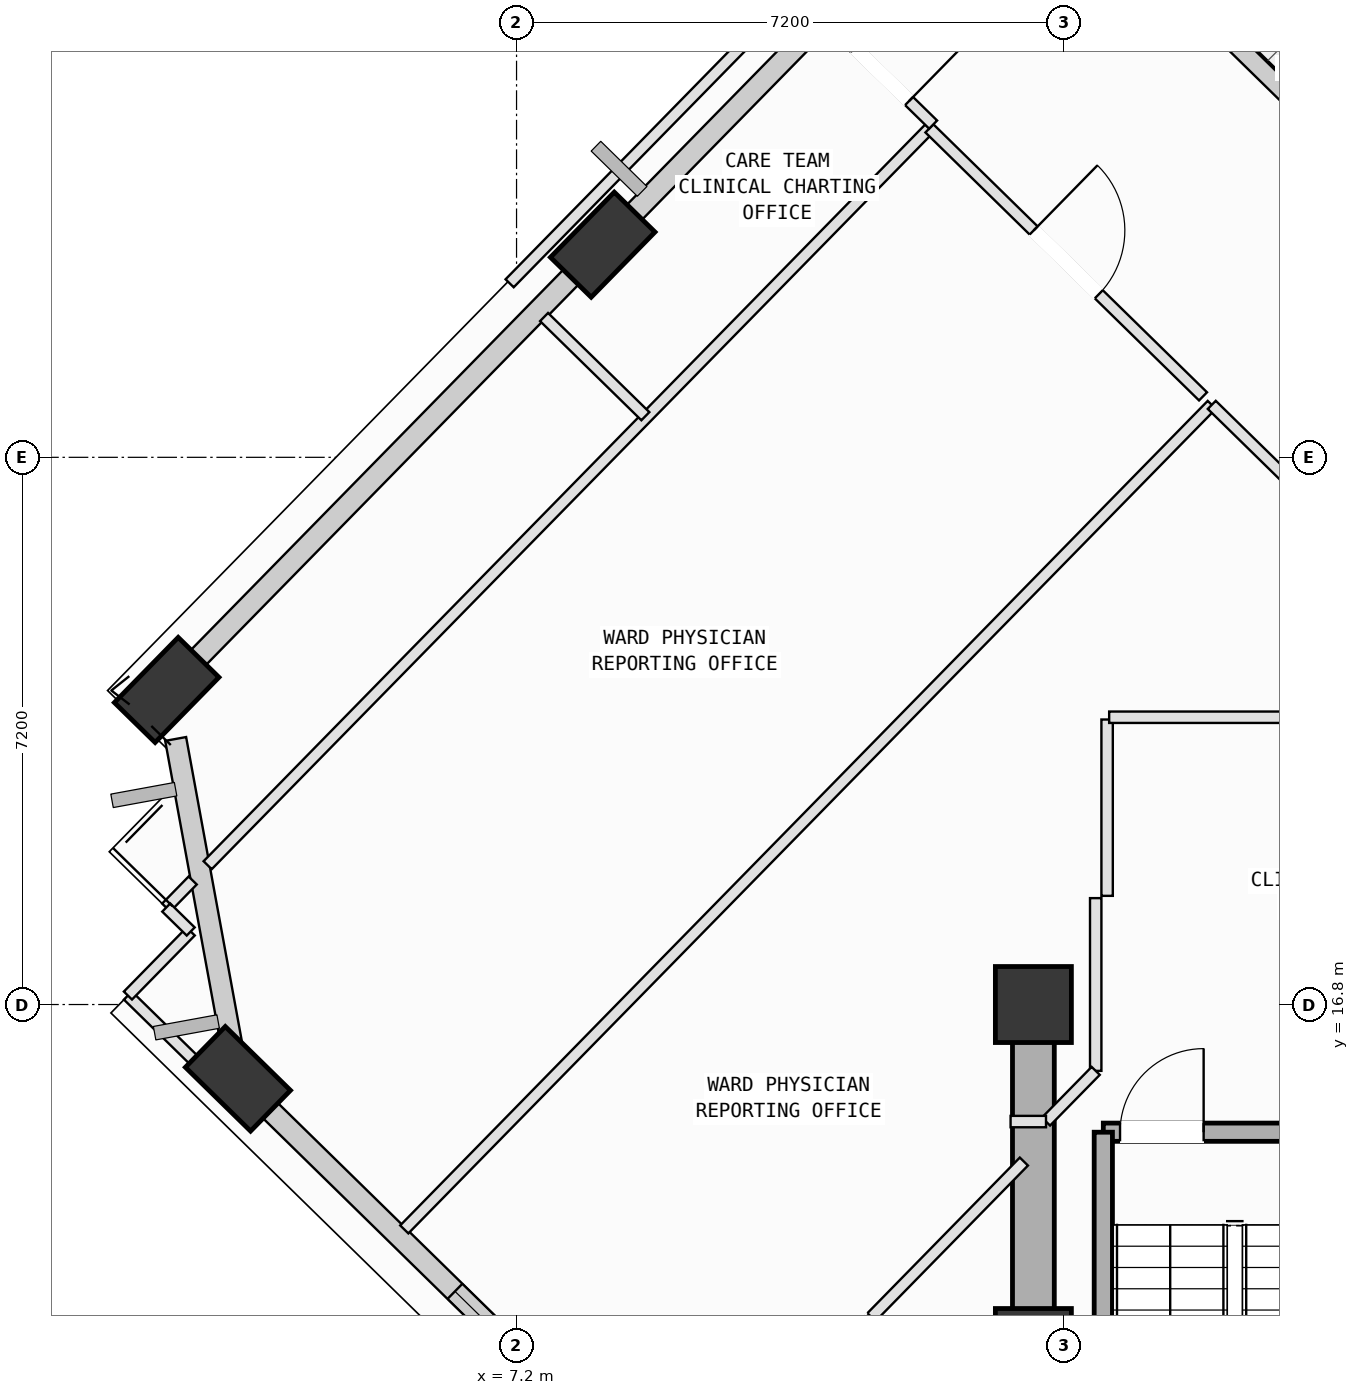
"""IFC4 building model, lengths in metres.
Left out: names, types, materials, properties, quantities, classifications, styles, units other than length and angle.
Written with IfcOpenShell. Run it as: python <this file> out.ifc"""

import sys

from ifc_helpers import new_model, si_unit, direction, frame, frame_2d, origin, origin_2d, place, context, subcontext, project, spatial, rectangle, extrude, element, fill, save


model = new_model("IFC4")
c1 = context("Model", 3, precision=1e-05, world=origin(), true_north=direction((0.0, 1.0)))
c2 = subcontext(c1, "Body", "Model", "MODEL_VIEW")
j1 = project(units=[si_unit("LENGTHUNIT", "METRE"), si_unit("PLANEANGLEUNIT", "RADIAN")], contexts=[c1])
p1 = place(None, origin())
s1 = spatial("IfcSite", under=j1, at=p1, CompositionType="ELEMENT")
p2 = place(p1, origin())
s2 = spatial("IfcBuilding", under=s1, at=p2, CompositionType="ELEMENT")
p3 = place(p2, frame((0.0, 0.0, 219.2)))
s3 = spatial("IfcBuildingStorey", under=s2, at=p3, CompositionType="ELEMENT", Elevation=219.2)
for number, where, z_axis, x_axis in (
    (1, (14.0, 12.3, 0.0), (0.0, 0.0, 1.0), (1.0, 0.0, 0.0)),
    (2, (14.0, 16.8, 0.0), (0.0, 0.0, 1.0), (1.0, 0.0, 0.0)),
):
    element("IfcColumn", number, at=place(p3, frame(where, z_axis=z_axis, x_axis=x_axis)), inside=s3, PredefinedType="COLUMN", context=c2, shape_type="SweptSolid", body=[
        extrude(rectangle(XDim=1.0, YDim=1.0, at=origin_2d()), origin(), (0.0, 0.0, 1.0), 4.0),
    ])
p4 = place(p3, frame((8.334, 26.798, 0.002), z_axis=(-0.007351582684, -0.104198052093, 0.994529396334), x_axis=(0.747937181643, 0.659560518907, 0.074631723923)))
e3 = element("IfcColumn", 3, at=p4, inside=s3, PredefinedType="COLUMN", context=c2, shape_type="SweptSolid", body=[
    extrude(rectangle(XDim=1.2, YDim=0.75, at=origin_2d()), origin(), (0.0, 0.0, 1.0), 4.018),
])
p5 = place(p3, frame((2.597, 20.939, 0.002), z_axis=(0.01696374855, -0.12734928376, 0.991712857213), x_axis=(0.599980057528, 0.794731585162, 0.091791274721)))
e4 = element("IfcColumn", 4, at=p5, inside=s3, PredefinedType="COLUMN", context=c2, shape_type="SweptSolid", body=[
    extrude(rectangle(XDim=1.2, YDim=0.75, at=origin_2d()), origin(), (0.0, 0.0, 1.0), 4.03),
])
p6 = place(p3, frame((3.534, 15.822, 0.002), z_axis=(0.037923851967, -0.123222228275, 0.991654205815), x_axis=(-0.886953136562, 0.452964918378, 0.090204857198)))
e5 = element("IfcColumn", 5, at=p6, inside=s3, PredefinedType="COLUMN", context=c2, shape_type="SweptSolid", body=[
    extrude(rectangle(XDim=1.2, YDim=0.75, at=origin_2d()), origin(), (0.0, 0.0, 1.0), 4.03),
])
p7 = place(p3, frame((15.708, 30.369, 0.0), z_axis=(0.0, 0.0, 1.0), x_axis=(0.71445197499, -0.699684482773, 0.0)))
e6 = element("IfcWall", 6, at=p7, inside=s3, PredefinedType="SOLIDWALL", context=c2, shape_type="SweptSolid", body=[
    extrude(rectangle(XDim=6.96, YDim=0.24, at=frame_2d((3.48, 0.0))), origin(), (0.0, 0.0, 1.0), 3.265),
])
p8 = place(p7, frame((3.597, 0.0, 0.0)))
e7 = element("IfcOpeningElement", 7, at=p8, cuts=e6, PredefinedType="OPENING", context=c2, shape_type="SweptSolid", body=[
    extrude(rectangle(XDim=1.1, YDim=2.15, at=frame_2d((0.55, 1.075))), frame((0.0, 0.13, 0.0), z_axis=(0.0, -1.0, 0.0), x_axis=(1.0, 0.0, 0.0)), (0.0, 0.0, 1.0), 0.26),
])
p9 = place(p3, frame((8.483, 26.951, 0.0), z_axis=(0.0, 0.0, 1.0), x_axis=(0.699662514677, 0.714473488351, 0.0)))
e8 = element("IfcWall", 8, at=p9, inside=s3, PredefinedType="SOLIDWALL", context=c2, shape_type="SweptSolid", body=[
    extrude(rectangle(XDim=7.434, YDim=0.28, at=frame_2d((3.717, 0.0))), origin(), (0.0, 0.0, 1.0), 3.265),
])
p10 = place(p3, frame((2.724, 21.069, 0.0), z_axis=(0.0, 0.0, 1.0), x_axis=(0.699663647381, 0.714472379125, 0.0)))
e9 = element("IfcWall", 9, at=p10, inside=s3, PredefinedType="SOLIDWALL", context=c2, shape_type="SweptSolid", body=[
    extrude(rectangle(XDim=7.485, YDim=0.28, at=frame_2d((3.742, 0.0))), origin(), (0.0, 0.0, 1.0), 3.265),
])
p11 = place(p3, frame((3.51, 15.958, 0.0), z_axis=(0.0, 0.0, 1.0), x_axis=(-0.180230519559, 0.983624399768, 0.0)))
e10 = element("IfcWall", 10, at=p11, inside=s3, PredefinedType="SOLIDWALL", context=c2, shape_type="SweptSolid", body=[
    extrude(rectangle(XDim=4.408, YDim=0.28, at=frame_2d((2.204, 0.0))), origin(), (0.0, 0.0, 1.0), 3.265),
])
p12 = place(p3, frame((8.133, 11.319, 0.0), z_axis=(0.0, 0.0, 1.0), x_axis=(-0.714479464063, 0.699656412414, 0.0)))
e11 = element("IfcWall", 11, at=p12, inside=s3, PredefinedType="SOLIDWALL", context=c2, shape_type="SweptSolid", body=[
    extrude(rectangle(XDim=5.831, YDim=0.28, at=frame_2d((2.915, 0.0))), origin(), (0.0, 0.0, 1.0), 3.265),
])
p13 = place(p12, frame((0.84, 0.0, 0.75)))
e12 = element("IfcOpeningElement", 12, at=p13, cuts=e11, PredefinedType="OPENING", context=c2, shape_type="SweptSolid", body=[
    extrude(rectangle(XDim=1.6, YDim=1.95, at=frame_2d((0.8, 0.975))), frame((0.0, 0.15, 0.0), z_axis=(0.0, -1.0, 0.0), x_axis=(1.0, 0.0, 0.0)), (0.0, 0.0, 1.0), 0.3),
])
p14 = place(p3, frame((14.92, 15.12, 0.0), z_axis=(0.0, 0.0, 1.0), x_axis=(1.0, 0.0, 0.0)))
e13 = element("IfcWall", 13, at=p14, inside=s3, PredefinedType="SOLIDWALL", context=c2, shape_type="SweptSolid", body=[
    extrude(rectangle(XDim=3.46, YDim=0.24, at=frame_2d((1.73, 0.0))), origin(), (0.0, 0.0, 1.0), 3.78),
])
p15 = place(p14, frame((0.22, 0.0, 0.0)))
e14 = element("IfcOpeningElement", 14, at=p15, cuts=e13, PredefinedType="OPENING", context=c2, shape_type="SweptSolid", body=[
    extrude(rectangle(XDim=1.1, YDim=2.15, at=frame_2d((0.55, 1.075))), frame((0.0, 0.13, 0.0), z_axis=(0.0, -1.0, 0.0), x_axis=(1.0, 0.0, 0.0)), (0.0, 0.0, 1.0), 0.26),
])
p16 = place(p3, frame((14.92, 8.075, 0.0), z_axis=(0.0, 0.0, 1.0), x_axis=(0.0, 1.0, 0.0)))
e15 = element("IfcWall", 15, at=p16, inside=s3, PredefinedType="SOLIDWALL", context=c2, shape_type="SweptSolid", body=[
    extrude(rectangle(XDim=7.045, YDim=0.24, at=frame_2d((3.522, 0.0))), origin(), (0.0, 0.0, 1.0), 3.78),
])
p17 = place(p3, frame((14.0, 16.8, 0.0), z_axis=(0.0, 0.0, 1.0), x_axis=(0.0, -1.0, 0.0)))
e16 = element("IfcWall", 16, at=p17, inside=s3, PredefinedType="SHEAR", context=c2, shape_type="SweptSolid", body=[
    extrude(rectangle(XDim=9.0, YDim=0.55, at=frame_2d((4.5, 0.0))), origin(), (0.0, 0.0, 1.0), 3.78),
])
p18 = place(p3, frame((9.438, 10.203, 0.0), z_axis=(0.0, 0.0, 1.0), x_axis=(0.699657139169, 0.714478752385, 0.0)))
e17 = element("IfcWall", 17, at=p18, inside=s3, PredefinedType="PARTITIONING", context=c2, shape_type="SweptSolid", body=[
    extrude(rectangle(XDim=6.342, YDim=0.15, at=frame_2d((3.171, 0.0))), origin(), (0.0, 0.0, 1.0), 3.78),
])
p19 = place(p18, frame((2.616, 0.0, 0.0)))
e18 = element("IfcOpeningElement", 18, at=p19, cuts=e17, PredefinedType="OPENING", context=c2, shape_type="SweptSolid", body=[
    extrude(rectangle(XDim=0.86, YDim=2.06, at=frame_2d((0.43, 1.03))), frame((0.0, 0.085, 0.0), z_axis=(0.0, -1.0, 0.0), x_axis=(1.0, 0.0, 0.0)), (0.0, 0.0, 1.0), 0.17),
])
p20 = place(p3, frame((14.97, 20.55, 0.0), z_axis=(0.0, 0.0, 1.0), x_axis=(0.0, -1.0, 0.0)))
e19 = element("IfcWall", 19, at=p20, inside=s3, PredefinedType="PARTITIONING", context=c2, shape_type="SweptSolid", body=[
    extrude(rectangle(XDim=2.32, YDim=0.15, at=frame_2d((1.16, 0.0))), origin(), (0.0, 0.0, 1.0), 3.78),
])
p21 = place(p3, frame((14.82, 18.2, 0.0), z_axis=(0.0, 0.0, 1.0), x_axis=(0.0, -1.0, 0.0)))
e20 = element("IfcWall", 20, at=p21, inside=s3, PredefinedType="PARTITIONING", context=c2, shape_type="SweptSolid", body=[
    extrude(rectangle(XDim=2.273, YDim=0.15, at=frame_2d((1.136, 0.0))), origin(), (0.0, 0.0, 1.0), 3.78),
])
p22 = place(p3, frame((14.82, 15.927, 0.0), z_axis=(0.0, 0.0, 1.0), x_axis=(-0.700147182602, -0.713998545303, 0.0)))
e21 = element("IfcWall", 21, at=p22, inside=s3, PredefinedType="PARTITIONING", context=c2, shape_type="SweptSolid", body=[
    extrude(rectangle(XDim=0.934, YDim=0.15, at=frame_2d((0.467, 0.0))), origin(), (0.0, 0.0, 1.0), 3.78),
])
p23 = place(p3, frame((14.166, 15.26, 0.0), z_axis=(0.0, 0.0, 1.0), x_axis=(-1.0, 0.0, 0.0)))
e22 = element("IfcWall", 22, at=p23, inside=s3, PredefinedType="PARTITIONING", context=c2, shape_type="SweptSolid", body=[
    extrude(rectangle(XDim=0.466, YDim=0.15, at=frame_2d((0.233, 0.0))), origin(), (0.0, 0.0, 1.0), 3.78),
])
p24 = place(p3, frame((5.723, 13.841, 0.0), z_axis=(0.0, 0.0, 1.0), x_axis=(0.69966395239, 0.714472080438, 0.0)))
e23 = element("IfcWall", 23, at=p24, inside=s3, PredefinedType="PARTITIONING", context=c2, shape_type="SweptSolid", body=[
    extrude(rectangle(XDim=15.185, YDim=0.15, at=frame_2d((7.592, 0.0))), origin(), (0.0, 0.0, 1.0), 3.78),
])
p25 = place(p3, frame((16.347, 24.69, 0.0), z_axis=(0.0, 0.0, 1.0), x_axis=(0.714527579213, -0.699607274508, 0.0)))
e24 = element("IfcWall", 24, at=p25, inside=s3, PredefinedType="PARTITIONING", context=c2, shape_type="SweptSolid", body=[
    extrude(rectangle(XDim=5.04, YDim=0.15, at=frame_2d((2.52, 0.0))), origin(), (0.0, 0.0, 1.0), 3.78),
])
p26 = place(p25, frame((1.92, 0.0, 0.0)))
e25 = element("IfcOpeningElement", 25, at=p26, cuts=e24, PredefinedType="OPENING", context=c2, shape_type="SweptSolid", body=[
    extrude(rectangle(XDim=1.2, YDim=2.15, at=frame_2d((0.6, 1.075))), frame((0.0, 0.085, 0.0), z_axis=(0.0, -1.0, 0.0), x_axis=(1.0, 0.0, 0.0)), (0.0, 0.0, 1.0), 0.17),
])
p27 = place(p3, frame((19.376, 20.58, 0.0), z_axis=(0.0, 0.0, 1.0), x_axis=(-1.0, 0.0, 0.0)))
e26 = element("IfcWall", 26, at=p27, inside=s3, PredefinedType="PARTITIONING", context=c2, shape_type="SweptSolid", body=[
    extrude(rectangle(XDim=4.379, YDim=0.15, at=frame_2d((2.189, 0.0))), origin(), (0.0, 0.0, 1.0), 3.78),
])
p28 = place(p3, frame((2.591, 18.076, 0.0), z_axis=(0.0, 0.0, 1.0), x_axis=(0.698967159118, 0.715153767014, 0.0)))
e27 = element("IfcWall", 27, at=p28, inside=s3, PredefinedType="PARTITIONING", context=c2, shape_type="SweptSolid", body=[
    extrude(rectangle(XDim=0.498, YDim=0.15, at=frame_2d((0.249, 0.0))), origin(), (0.0, 0.0, 1.0), 3.78),
])
p29 = place(p3, frame((3.136, 18.633, 0.0), z_axis=(0.0, 0.0, 1.0), x_axis=(0.699746859046, 0.71439088268, 0.0)))
e28 = element("IfcWall", 28, at=p29, inside=s3, PredefinedType="PARTITIONING", context=c2, shape_type="SweptSolid", body=[
    extrude(rectangle(XDim=13.571, YDim=0.15, at=frame_2d((6.785, 0.0))), origin(), (0.0, 0.0, 1.0), 3.78),
])
p30 = place(p3, frame((12.632, 28.328, 0.0), z_axis=(0.0, 0.0, 1.0), x_axis=(0.714408997324, -0.699728364826, 0.0)))
e29 = element("IfcWall", 29, at=p30, inside=s3, PredefinedType="PARTITIONING", context=c2, shape_type="SweptSolid", body=[
    extrude(rectangle(XDim=5.039, YDim=0.15, at=frame_2d((2.52, 0.0))), origin(), (0.0, 0.0, 1.0), 3.78),
])
p31 = place(p30, frame((1.92, 0.0, 0.0)))
e30 = element("IfcOpeningElement", 30, at=p31, cuts=e29, PredefinedType="OPENING", context=c2, shape_type="SweptSolid", body=[
    extrude(rectangle(XDim=1.2, YDim=2.15, at=frame_2d((0.6, 1.075))), frame((0.0, 0.085, 0.0), z_axis=(0.0, -1.0, 0.0), x_axis=(1.0, 0.0, 0.0)), (0.0, 0.0, 1.0), 0.17),
])
p32 = place(p3, frame((3.807, 15.234, 0.0), z_axis=(0.0, 0.0, 1.0), x_axis=(-0.714522045157, 0.699612926542, 0.0)))
e31 = element("IfcWall", 31, at=p32, inside=s3, PredefinedType="PARTITIONING", context=c2, shape_type="SweptSolid", body=[
    extrude(rectangle(XDim=2.407, YDim=0.15, at=frame_2d((1.204, 0.0))), origin(), (0.0, 0.0, 1.0), 3.265),
])
p33 = place(p3, frame((2.087, 16.918, 0.0), z_axis=(0.0, 0.0, 1.0), x_axis=(0.699934912772, 0.714206635284, 0.0)))
e32 = element("IfcWall", 32, at=p33, inside=s3, PredefinedType="PARTITIONING", context=c2, shape_type="SweptSolid", body=[
    extrude(rectangle(XDim=1.18, YDim=0.15, at=frame_2d((0.59, 0.0))), origin(), (0.0, 0.0, 1.0), 3.78),
])
p34 = place(p3, frame((2.913, 17.761, 0.0), z_axis=(0.0, 0.0, 1.0), x_axis=(-0.714922371117, 0.699203835285, 0.0)))
e33 = element("IfcWall", 33, at=p34, inside=s3, PredefinedType="PARTITIONING", context=c2, shape_type="SweptSolid", body=[
    extrude(rectangle(XDim=0.45, YDim=0.15, at=frame_2d((0.225, 0.0))), origin(), (0.0, 0.0, 1.0), 3.78),
])
p35 = place(p3, frame((8.895, 24.541, 0.0), z_axis=(0.0, 0.0, 1.0), x_axis=(-0.714592202045, 0.699541267386, 0.0)))
e34 = element("IfcWall", 34, at=p35, inside=s3, PredefinedType="PARTITIONING", context=c2, shape_type="SweptSolid", body=[
    extrude(rectangle(XDim=1.865, YDim=0.15, at=frame_2d((0.933, 0.0))), origin(), (0.0, 0.0, 1.0), 3.78),
])
p36 = place(p3, frame((7.109, 26.29, 0.0), z_axis=(0.0, 0.0, 1.0), x_axis=(0.699639245375, 0.71449627454, 0.0)))
e35 = element("IfcWall", 35, at=p36, inside=s3, PredefinedType="PARTITIONING", context=c2, shape_type="SweptSolid", body=[
    extrude(rectangle(XDim=5.39, YDim=0.15, at=frame_2d((2.695, 0.0))), origin(), (0.0, 0.0, 1.0), 3.78),
])
p37 = place(p3, frame((11.333, 29.697, 0.0), z_axis=(0.0, 0.0, 1.0), x_axis=(0.714703185828, -0.699427877745, 0.0)))
e36 = element("IfcWall", 36, at=p37, inside=s3, PredefinedType="PARTITIONING", context=c2, shape_type="SweptSolid", body=[
    extrude(rectangle(XDim=1.886, YDim=0.15, at=frame_2d((0.943, 0.0))), origin(), (0.0, 0.0, 1.0), 3.78),
])
p38 = place(p37, frame((0.443, 0.0, 0.0)))
e37 = element("IfcOpeningElement", 37, at=p38, cuts=e36, PredefinedType="OPENING", context=c2, shape_type="SweptSolid", body=[
    extrude(rectangle(XDim=1.0, YDim=2.12, at=frame_2d((0.5, 1.06))), frame((0.0, 0.085, 0.0), z_axis=(0.0, -1.0, 0.0), x_axis=(1.0, 0.0, 0.0)), (0.0, 0.0, 1.0), 0.17),
])
p39 = place(p13, origin())
e38 = element("IfcWindow", 38, at=p39, inside=s3, PartitioningType="SINGLE_PANEL", PredefinedType="WINDOW", context=c2, shape_type="SweptSolid", body=[
    extrude(rectangle(XDim=1.6, YDim=1.95, at=frame_2d((0.8, 0.975))), frame((0.0, 0.03, 0.0), z_axis=(0.0, -1.0, 0.0), x_axis=(1.0, 0.0, 0.0)), (0.0, 0.0, 1.0), 0.06),
])
fill(e12, e38)
p40 = place(p15, origin())
e39 = element("IfcDoor", 39, at=p40, inside=s3, OperationType="SINGLE_SWING_RIGHT", PredefinedType="DOOR", context=c2, shape_type="SweptSolid", body=[
    extrude(rectangle(XDim=1.1, YDim=2.15, at=frame_2d((0.55, 1.075))), frame((0.0, 0.025, 0.0), z_axis=(0.0, -1.0, 0.0), x_axis=(1.0, 0.0, 0.0)), (0.0, 0.0, 1.0), 0.05),
])
fill(e14, e39)
p41 = place(p31, origin())
e40 = element("IfcDoor", 40, at=p41, inside=s3, OperationType="SINGLE_SWING_LEFT", PredefinedType="DOOR", context=c2, shape_type="SweptSolid", body=[
    extrude(rectangle(XDim=1.2, YDim=2.15, at=frame_2d((0.6, 1.075))), frame((0.0, 0.025, 0.0), z_axis=(0.0, -1.0, 0.0), x_axis=(1.0, 0.0, 0.0)), (0.0, 0.0, 1.0), 0.05),
])
fill(e30, e40)
p42 = place(p38, origin())
e41 = element("IfcDoor", 41, at=p42, inside=s3, OperationType="SINGLE_SWING_RIGHT", PredefinedType="DOOR", context=c2, shape_type="SweptSolid", body=[
    extrude(rectangle(XDim=1.0, YDim=2.12, at=frame_2d((0.5, 1.06))), frame((0.0, 0.025, 0.0), z_axis=(0.0, -1.0, 0.0), x_axis=(1.0, 0.0, 0.0)), (0.0, 0.0, 1.0), 0.05),
])
fill(e37, e41)
save(model, sys.argv[1])
